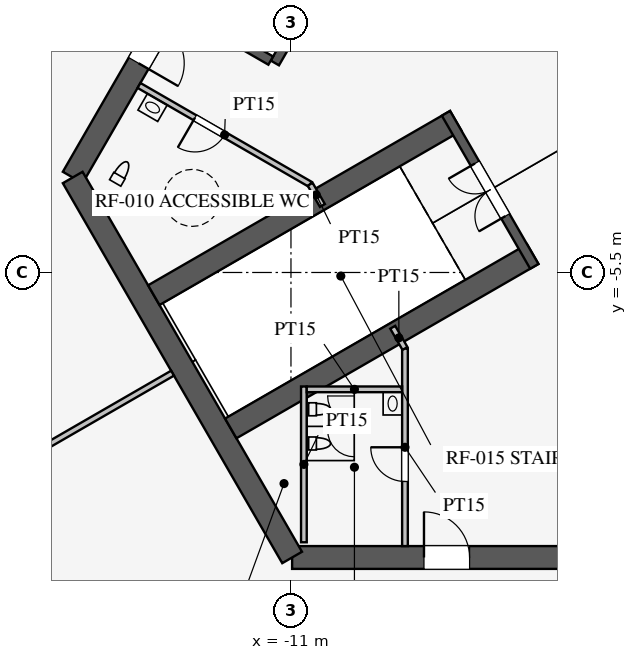
"""IFC4 building model, lengths in metres.
Left out: names, types, materials, properties, quantities, classifications, styles, units other than length and angle.
Written with IfcOpenShell. Run it as: python <this file> out.ifc"""

import sys

from ifc_helpers import new_model, si_unit, direction, frame, frame_2d, origin, place, context, subcontext, project, spatial, polyline, rectangle, outline, extrude, element, fill, save


model = new_model("IFC4")
c1 = context("Model", 3, precision=1e-05, world=origin(), true_north=direction((0.0, 1.0)))
c2 = subcontext(c1, "Body", "Model", "MODEL_VIEW")
j1 = project(units=[si_unit("LENGTHUNIT", "METRE"), si_unit("PLANEANGLEUNIT", "RADIAN")], contexts=[c1])
p1 = place(None, origin())
s1 = spatial("IfcSite", under=j1, at=p1, CompositionType="ELEMENT")
p2 = place(p1, origin())
s2 = spatial("IfcBuilding", under=s1, at=p2, CompositionType="ELEMENT")
p3 = place(p2, frame((0.0, 0.0, 328.5)))
s3 = spatial("IfcBuildingStorey", under=s2, at=p3, CompositionType="ELEMENT", Elevation=328.5)
p4 = place(p3, frame((-10.97, -13.0, 0.0), z_axis=(0.0, 0.0, 1.0), x_axis=(1.0, 0.0, 0.0)))
e1 = element("IfcWall", 1, at=p4, inside=s3, PredefinedType="SHEAR", context=c2, shape_type="SweptSolid", body=[
    extrude(outline(polyline([(0.0, 0.0), (21.939, 0.0), (21.939, 8.31), (0.0, 8.31), (0.0, 0.0)])), frame((0.0, 0.3, 0.0), z_axis=(0.0, -1.0, 0.0), x_axis=(1.0, 0.0, 0.0)), (0.0, 0.0, 1.0), 0.6),
])
p5 = place(p4, frame((17.27, 0.0, 0.0)))
e2 = element("IfcOpeningElement", 2, at=p5, cuts=e1, PredefinedType="OPENING", context=c2, shape_type="SweptSolid", body=[
    extrude(rectangle(XDim=1.2, YDim=2.1, at=frame_2d((0.6, 1.05))), frame((0.0, 0.31, 0.0), z_axis=(0.0, -1.0, 0.0), x_axis=(1.0, 0.0, 0.0)), (0.0, 0.0, 1.0), 0.62),
])
p6 = place(p4, frame((3.47, 0.0, 0.0)))
e3 = element("IfcOpeningElement", 3, at=p6, cuts=e1, PredefinedType="OPENING", context=c2, shape_type="SweptSolid", body=[
    extrude(rectangle(XDim=1.2, YDim=2.1, at=frame_2d((0.6, 1.05))), frame((0.0, 0.31, 0.0), z_axis=(0.0, -1.0, 0.0), x_axis=(1.0, 0.0, 0.0)), (0.0, 0.0, 1.0), 0.62),
])
p7 = place(p3, frame((-5.773, 16.0, 0.0), z_axis=(0.0, 0.0, 1.0), x_axis=(-0.500002442456, -0.866023993627, 0.0)))
e4 = element("IfcWall", 4, at=p7, inside=s3, PredefinedType="SHEAR", context=c2, shape_type="SweptSolid", body=[
    extrude(outline(polyline([(0.0, 0.0), (21.939, 0.0), (21.939, 12.973), (0.0, 21.833), (0.0, 0.0)])), frame((0.0, 0.3, 0.0), z_axis=(0.0, -1.0, 0.0), x_axis=(1.0, 0.0, 0.0)), (0.0, 0.0, 1.0), 0.6),
])
p8 = place(p7, frame((17.27, 0.0, 0.0)))
e5 = element("IfcOpeningElement", 5, at=p8, cuts=e4, PredefinedType="OPENING", context=c2, shape_type="SweptSolid", body=[
    extrude(rectangle(XDim=1.2, YDim=2.1, at=frame_2d((0.6, 1.05))), frame((0.0, 0.31, 0.0), z_axis=(0.0, -1.0, 0.0), x_axis=(1.0, 0.0, 0.0)), (0.0, 0.0, 1.0), 0.62),
])
p9 = place(p7, frame((3.47, 0.0, 0.0)))
e6 = element("IfcOpeningElement", 6, at=p9, cuts=e4, PredefinedType="OPENING", context=c2, shape_type="SweptSolid", body=[
    extrude(rectangle(XDim=1.2, YDim=2.1, at=frame_2d((0.6, 1.05))), frame((0.0, 0.31, 0.0), z_axis=(0.0, -1.0, 0.0), x_axis=(1.0, 0.0, 0.0)), (0.0, 0.0, 1.0), 0.62),
])
p10 = place(p3, frame((-16.743, -3.0, 0.0), z_axis=(0.0, 0.0, 1.0), x_axis=(0.499995765644, -0.866027848477, 0.0)))
e7 = element("IfcWall", 7, at=p10, inside=s3, PredefinedType="SHEAR", context=c2, shape_type="SweptSolid", body=[
    extrude(outline(polyline([(0.0, 0.0), (11.547, 0.0), (11.547, 8.31), (0.0, 12.973), (0.0, 0.0)])), frame((0.0, 0.3, 0.0), z_axis=(0.0, -1.0, 0.0), x_axis=(1.0, 0.0, 0.0)), (0.0, 0.0, 1.0), 0.6),
])
p11 = place(p3, frame((-8.574, 4.95, 0.0), z_axis=(0.0, 0.0, 1.0), x_axis=(-0.49998570155, -0.866033658841, 0.0)))
e8 = element("IfcWall", 8, at=p11, inside=s3, PredefinedType="SHEAR", context=c2, shape_type="SweptSolid", body=[
    extrude(rectangle(XDim=5.7, YDim=0.25, at=frame_2d((2.85, 0.0))), origin(), (0.0, 0.0, 1.0), 4.7),
])
p12 = place(p11, frame((0.825, 0.0, 0.0)))
e9 = element("IfcOpeningElement", 9, at=p12, cuts=e8, PredefinedType="OPENING", context=c2, shape_type="SweptSolid", body=[
    extrude(rectangle(XDim=1.2, YDim=2.2, at=frame_2d((0.6, 1.1))), frame((0.0, 0.135, 0.0), z_axis=(0.0, -1.0, 0.0), x_axis=(1.0, 0.0, 0.0)), (0.0, 0.0, 1.0), 0.27),
])
p13 = place(p11, frame((3.675, 0.0, 0.0)))
e10 = element("IfcOpeningElement", 10, at=p13, cuts=e8, PredefinedType="OPENING", context=c2, shape_type="SweptSolid", body=[
    extrude(rectangle(XDim=1.2, YDim=2.2, at=frame_2d((0.6, 1.1))), frame((0.0, 0.135, 0.0), z_axis=(0.0, -1.0, 0.0), x_axis=(1.0, 0.0, 0.0)), (0.0, 0.0, 1.0), 0.27),
])
p14 = place(p3, frame((-11.532, 0.076, 0.0), z_axis=(0.0, 0.0, 1.0), x_axis=(-0.86604424267, 0.499967368674, 0.0)))
e11 = element("IfcWall", 11, at=p14, inside=s3, PredefinedType="SHEAR", context=c2, shape_type="SweptSolid", body=[
    extrude(rectangle(XDim=2.675, YDim=0.25, at=frame_2d((1.337, 0.0))), origin(), (0.0, 0.0, 1.0), 4.7),
])
p15 = place(p3, frame((-6.663, -1.509, 0.0), z_axis=(0.0, 0.0, 1.0), x_axis=(-0.86603049496, -0.499991181721, 0.0)))
e12 = element("IfcWall", 12, at=p15, inside=s3, PredefinedType="SHEAR", context=c2, shape_type="SweptSolid", body=[
    extrude(rectangle(XDim=9.175, YDim=0.6, at=frame_2d((4.587, 0.0))), origin(), (0.0, 0.0, 1.0), 3.2),
])
p16 = place(p3, frame((-4.638, -5.016, 0.0), z_axis=(0.0, 0.0, 1.0), x_axis=(-0.866012320003, -0.50002266109, 0.0)))
e13 = element("IfcWall", 13, at=p16, inside=s3, PredefinedType="SHEAR", context=c2, shape_type="SweptSolid", body=[
    extrude(rectangle(XDim=9.175, YDim=0.6, at=frame_2d((4.587, 0.0))), origin(), (0.0, 0.0, 1.0), 3.2),
])
p17 = place(p3, frame((-6.922, -1.312, 0.0), z_axis=(0.0, 0.0, 1.0), x_axis=(0.499984536904, -0.866034331223, 0.0)))
e14 = element("IfcWall", 14, at=p17, inside=s3, PredefinedType="SHEAR", context=c2, shape_type="SweptSolid", body=[
    extrude(rectangle(XDim=4.65, YDim=0.25, at=frame_2d((2.325, 0.0))), origin(), (0.0, 0.0, 1.0), 3.2),
])
p18 = place(p17, frame((1.525, 0.0, 0.0)))
e15 = element("IfcOpeningElement", 15, at=p18, cuts=e14, PredefinedType="OPENING", context=c2, shape_type="SweptSolid", body=[
    extrude(rectangle(XDim=1.6, YDim=2.1, at=frame_2d((0.8, 1.05))), frame((0.0, 0.135, 0.0), z_axis=(0.0, -1.0, 0.0), x_axis=(1.0, 0.0, 0.0)), (0.0, 0.0, 1.0), 0.27),
])
p19 = place(p3, frame((-8.0, -7.5, 0.0), z_axis=(0.0, 0.0, 1.0), x_axis=(0.0, -1.0, 0.0)))
e16 = element("IfcWall", 16, at=p19, inside=s3, PredefinedType="PARTITIONING", context=c2, shape_type="SweptSolid", body=[
    extrude(rectangle(XDim=5.2, YDim=0.15, at=frame_2d((2.6, 0.0))), origin(), (0.0, 0.0, 1.0), 3.2),
])
p20 = place(p19, frame((2.6, 0.0, 0.0)))
e17 = element("IfcOpeningElement", 17, at=p20, cuts=e16, PredefinedType="OPENING", context=c2, shape_type="SweptSolid", body=[
    extrude(rectangle(XDim=0.9, YDim=2.1, at=frame_2d((0.45, 1.05))), frame((0.0, 0.085, 0.0), z_axis=(0.0, -1.0, 0.0), x_axis=(1.0, 0.0, 0.0)), (0.0, 0.0, 1.0), 0.17),
])
p21 = place(p3, frame((-10.495, -3.178, 0.0), z_axis=(0.0, 0.0, 1.0), x_axis=(-0.866021400173, 0.500006934395, 0.0)))
e18 = element("IfcWall", 18, at=p21, inside=s3, PredefinedType="PARTITIONING", context=c2, shape_type="SweptSolid", body=[
    extrude(rectangle(XDim=5.2, YDim=0.15, at=frame_2d((2.6, 0.0))), origin(), (0.0, 0.0, 1.0), 3.2),
])
p22 = place(p21, frame((2.6, 0.0, 0.0)))
e19 = element("IfcOpeningElement", 19, at=p22, cuts=e18, PredefinedType="OPENING", context=c2, shape_type="SweptSolid", body=[
    extrude(rectangle(XDim=0.9, YDim=2.1, at=frame_2d((0.45, 1.05))), frame((0.0, 0.085, 0.0), z_axis=(0.0, -1.0, 0.0), x_axis=(1.0, 0.0, 0.0)), (0.0, 0.0, 1.0), 0.17),
])
for number, where, z_axis, x_axis in (
    (20, (-10.495, -3.178, 0.0), (0.0, 0.0, 1.0), (0.5, -0.866, 0.0)),
    (21, (-8.0, -7.5, 0.0), (0.0, 0.0, 1.0), (-0.5, 0.866, 0.0)),
):
    element("IfcWall", number, at=place(p3, frame(where, z_axis=z_axis, x_axis=x_axis)), inside=s3, PredefinedType="PARTITIONING", context=c2, shape_type="SweptSolid", body=[
        extrude(rectangle(XDim=0.645, YDim=0.15, at=frame_2d((0.323, 0.0))), origin(), (0.0, 0.0, 1.0), 3.2),
    ])
p23 = place(p3, frame((-10.66, -8.5, 0.0), z_axis=(0.0, 0.0, 1.0), x_axis=(0.0, -1.0, 0.0)))
e22 = element("IfcWall", 22, at=p23, inside=s3, PredefinedType="PARTITIONING", context=c2, shape_type="SweptSolid", body=[
    extrude(rectangle(XDim=4.1, YDim=0.15, at=frame_2d((2.05, 0.0))), origin(), (0.0, 0.0, 1.0), 3.2),
])
p24 = place(p3, frame((-8.075, -8.575, 0.0), z_axis=(0.0, 0.0, 1.0), x_axis=(-1.0, 0.0, 0.0)))
e23 = element("IfcWall", 23, at=p24, inside=s3, PredefinedType="PARTITIONING", context=c2, shape_type="SweptSolid", body=[
    extrude(rectangle(XDim=2.51, YDim=0.15, at=frame_2d((1.255, 0.0))), origin(), (0.0, 0.0, 1.0), 3.2),
])
p25 = place(p3, frame((-14.116, -8.15, 0.0), z_axis=(0.0, 0.0, 1.0), x_axis=(-0.866020541135, -0.500008422262, 0.0)))
e24 = element("IfcWall", 24, at=p25, inside=s3, PredefinedType="PARTITIONING", context=c2, shape_type="SweptSolid", body=[
    extrude(rectangle(XDim=13.45, YDim=0.15, at=frame_2d((6.725, 0.0))), origin(), (0.0, 0.0, 1.0), 3.2),
])
p26 = place(p20, frame((0.9, 0.0, 0.0), z_axis=(0.0, 0.0, 1.0), x_axis=(-1.0, 0.0, 0.0)))
e25 = element("IfcDoor", 25, at=p26, inside=s3, OperationType="SINGLE_SWING_RIGHT", PredefinedType="DOOR", context=c2, shape_type="SweptSolid", body=[
    extrude(rectangle(XDim=0.9, YDim=2.1, at=frame_2d((0.45, 1.05))), frame((0.0, 0.025, 0.0), z_axis=(0.0, -1.0, 0.0), x_axis=(1.0, 0.0, 0.0)), (0.0, 0.0, 1.0), 0.05),
])
fill(e17, e25)
p27 = place(p22, origin())
e26 = element("IfcDoor", 26, at=p27, inside=s3, OperationType="SINGLE_SWING_RIGHT", PredefinedType="DOOR", context=c2, shape_type="SweptSolid", body=[
    extrude(rectangle(XDim=0.9, YDim=2.1, at=frame_2d((0.45, 1.05))), frame((0.0, 0.025, 0.0), z_axis=(0.0, -1.0, 0.0), x_axis=(1.0, 0.0, 0.0)), (0.0, 0.0, 1.0), 0.05),
])
fill(e19, e26)
p28 = place(p18, frame((1.6, 0.0, 0.0), z_axis=(0.0, 0.0, 1.0), x_axis=(-1.0, 0.0, 0.0)))
e27 = element("IfcDoor", 27, at=p28, inside=s3, OperationType="DOUBLE_DOOR_SINGLE_SWING", PredefinedType="DOOR", context=c2, shape_type="SweptSolid", body=[
    extrude(rectangle(XDim=1.6, YDim=2.1, at=frame_2d((0.8, 1.05))), frame((0.0, 0.025, 0.0), z_axis=(0.0, -1.0, 0.0), x_axis=(1.0, 0.0, 0.0)), (0.0, 0.0, 1.0), 0.05),
])
fill(e15, e27)
p29 = place(p6, origin())
e28 = element("IfcDoor", 28, at=p29, inside=s3, OperationType="SINGLE_SWING_LEFT", PredefinedType="DOOR", context=c2, shape_type="SweptSolid", body=[
    extrude(rectangle(XDim=1.2, YDim=2.1, at=frame_2d((0.6, 1.05))), frame((0.0, 0.025, 0.0), z_axis=(0.0, -1.0, 0.0), x_axis=(1.0, 0.0, 0.0)), (0.0, 0.0, 1.0), 0.05),
])
fill(e3, e28)
p30 = place(p8, origin())
e29 = element("IfcDoor", 29, at=p30, inside=s3, OperationType="SINGLE_SWING_RIGHT", PredefinedType="DOOR", context=c2, shape_type="SweptSolid", body=[
    extrude(rectangle(XDim=1.2, YDim=2.1, at=frame_2d((0.6, 1.05))), frame((0.0, 0.025, 0.0), z_axis=(0.0, -1.0, 0.0), x_axis=(1.0, 0.0, 0.0)), (0.0, 0.0, 1.0), 0.05),
])
fill(e5, e29)
save(model, sys.argv[1])
